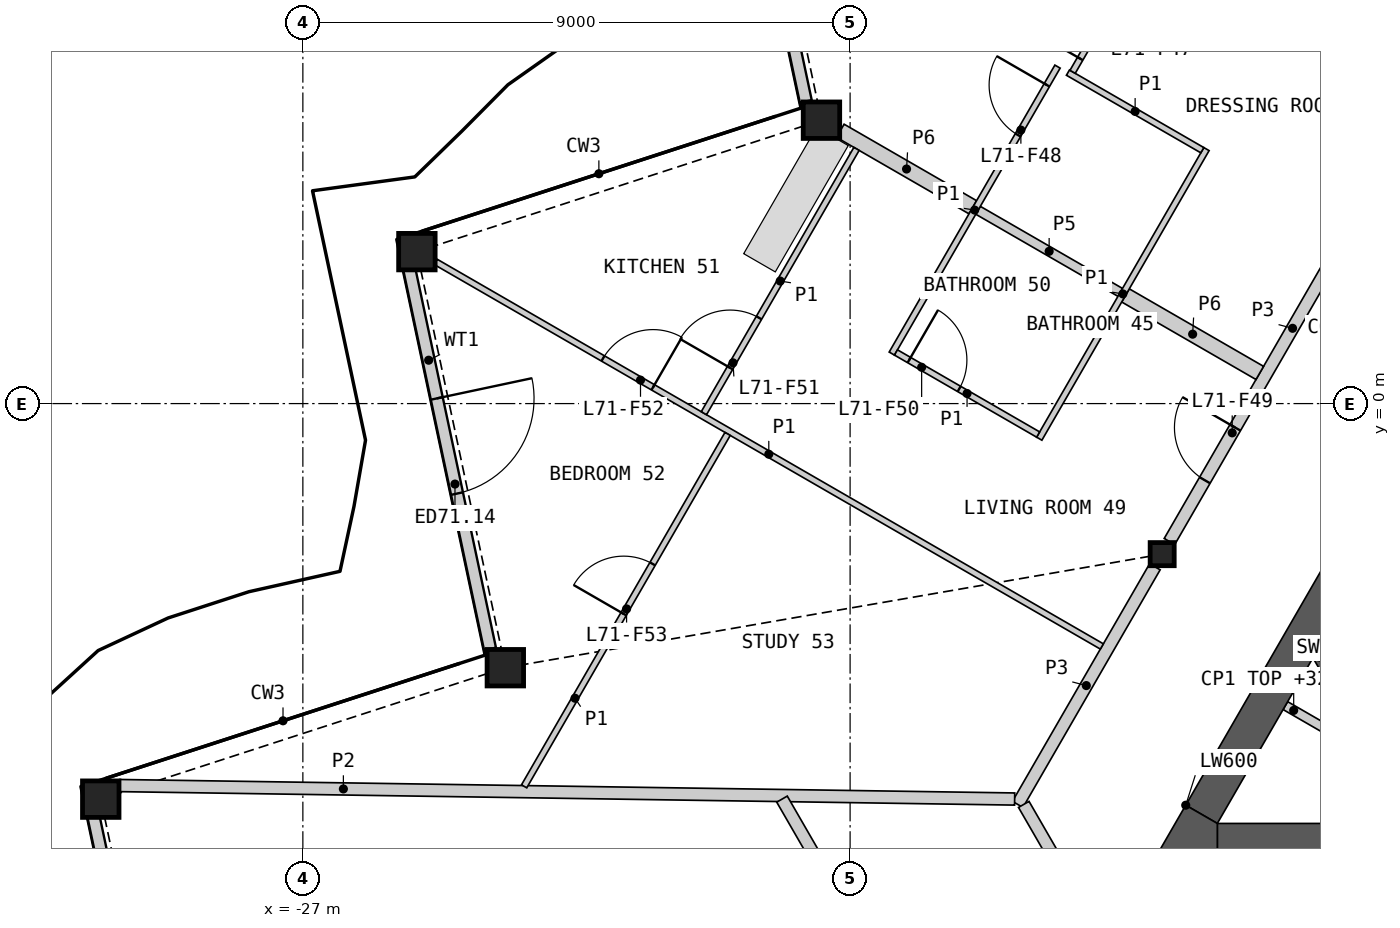
"""IFC4 building model, lengths in metres.
Left out: names, types, materials, properties, quantities, classifications, styles, units other than length and angle.
Written with IfcOpenShell. Run it as: python <this file> out.ifc"""

import sys

from ifc_helpers import new_model, si_unit, direction, frame, frame_2d, origin, origin_2d, place, context, subcontext, project, spatial, polyline, rectangle, hollow_rectangle, i_section, outline, extrude, element, fill, save


model = new_model("IFC4")
c1 = context("Model", 3, precision=1e-05, world=origin(), true_north=direction((0.0, 1.0)))
c2 = subcontext(c1, "Body", "Model", "MODEL_VIEW")
j1 = project(units=[si_unit("LENGTHUNIT", "METRE"), si_unit("PLANEANGLEUNIT", "RADIAN")], contexts=[c1])
p1 = place(None, origin())
s1 = spatial("IfcSite", under=j1, at=p1, CompositionType="ELEMENT")
p2 = place(p1, origin())
s2 = spatial("IfcBuilding", under=s1, at=p2, CompositionType="ELEMENT")
p3 = place(p2, frame((0.0, 0.0, 322.2)))
s3 = spatial("IfcBuildingStorey", under=s2, at=p3, CompositionType="ELEMENT", Elevation=322.2)
for number, where, z_axis, x_axis in (
    (1, (-18.471, 4.661, 0.0), (0.0, 0.0, 1.0), (1.0, 0.0, 0.0)),
    (2, (-25.125, 2.499, 0.0), (0.0, 0.0, 1.0), (1.0, 0.0, 0.0)),
    (3, (-23.67, -4.344, 0.0), (0.0, 0.0, 1.0), (1.0, 0.0, 0.0)),
    (4, (-30.324, -6.506, 0.0), (0.0, 0.0, 1.0), (1.0, 0.0, 0.0)),
):
    element("IfcColumn", number, at=place(p3, frame(where, z_axis=z_axis, x_axis=x_axis)), inside=s3, PredefinedType="COLUMN", context=c2, shape_type="SweptSolid", body=[
        extrude(hollow_rectangle(XDim=0.6, YDim=0.6, WallThickness=0.04, at=origin_2d()), origin(), (0.0, 0.0, 1.0), 3.4),
    ])
p4 = place(p3, frame((-12.868, -2.476, 0.0), z_axis=(0.0, 0.0, 1.0), x_axis=(1.0, 0.0, 0.0)))
e5 = element("IfcColumn", 5, at=p4, inside=s3, PredefinedType="COLUMN", context=c2, shape_type="SweptSolid", body=[
    extrude(i_section(OverallWidth=0.396, OverallDepth=0.381, WebThickness=0.019, FlangeThickness=0.03, at=origin_2d()), origin(), (0.0, 0.0, 1.0), 3.4),
])
p5 = place(p3, frame((-20.073, 11.294, 0.0), z_axis=(0.0, 0.0, 1.0), x_axis=(0.207893978909, -0.978151365349, 0.0)))
e6 = element("IfcWall", 6, at=p5, inside=s3, PredefinedType="SOLIDWALL", context=c2, shape_type="SweptSolid", body=[
    extrude(rectangle(XDim=6.466, YDim=0.2, at=frame_2d((3.233, 0.0))), origin(), (0.0, 0.0, 1.0), 2.488),
])
p6 = place(p5, frame((2.261, 0.0, 0.0)))
e7 = element("IfcOpeningElement", 7, at=p6, cuts=e6, PredefinedType="OPENING", context=c2, shape_type="SweptSolid", body=[
    extrude(rectangle(XDim=1.6, YDim=2.25, at=frame_2d((0.8, 1.125))), frame((0.0, 0.11, 0.0), z_axis=(0.0, -1.0, 0.0), x_axis=(1.0, 0.0, 0.0)), (0.0, 0.0, 1.0), 0.22),
])
p7 = place(p3, frame((-25.268, 2.297, 0.0), z_axis=(0.0, 0.0, 1.0), x_axis=(0.207937232358, -0.978142171363, 0.0)))
e8 = element("IfcWall", 8, at=p7, inside=s3, PredefinedType="SOLIDWALL", context=c2, shape_type="SweptSolid", body=[
    extrude(rectangle(XDim=6.474, YDim=0.2, at=frame_2d((3.237, 0.0))), origin(), (0.0, 0.0, 1.0), 2.488),
])
p8 = place(p7, frame((2.261, 0.0, 0.0)))
e9 = element("IfcOpeningElement", 9, at=p8, cuts=e8, PredefinedType="OPENING", context=c2, shape_type="SweptSolid", body=[
    extrude(rectangle(XDim=1.6, YDim=2.25, at=frame_2d((0.8, 1.125))), frame((0.0, 0.11, 0.0), z_axis=(0.0, -1.0, 0.0), x_axis=(1.0, 0.0, 0.0)), (0.0, 0.0, 1.0), 0.22),
])
p9 = place(p3, frame((-30.462, -6.701, 0.0), z_axis=(0.0, 0.0, 1.0), x_axis=(0.207915966693, -0.978146691859, 0.0)))
e10 = element("IfcWall", 10, at=p9, inside=s3, PredefinedType="SOLIDWALL", context=c2, shape_type="SweptSolid", body=[
    extrude(rectangle(XDim=6.482, YDim=0.2, at=frame_2d((3.241, 0.0))), origin(), (0.0, 0.0, 1.0), 2.488),
])
p10 = place(p9, frame((2.261, 0.0, 0.0)))
e11 = element("IfcOpeningElement", 11, at=p10, cuts=e10, PredefinedType="OPENING", context=c2, shape_type="SweptSolid", body=[
    extrude(rectangle(XDim=1.6, YDim=2.25, at=frame_2d((0.8, 1.125))), frame((0.0, 0.11, 0.0), z_axis=(0.0, -1.0, 0.0), x_axis=(1.0, 0.0, 0.0)), (0.0, 0.0, 1.0), 0.22),
])
p11 = place(p3, origin())
e12 = element("IfcWall", 12, at=p11, inside=s3, PredefinedType="SHEAR", context=c2, shape_type="SweptSolid", body=[
    extrude(outline(polyline([(-5.307, -1.281), (-10.374, -4.206), (-10.032, -4.298), (-5.182, -1.498), (-5.307, -1.281)])), origin(), (0.0, 0.0, 1.0), 3.1),
])
p12 = place(p3, origin())
e13 = element("IfcWall", 13, at=p12, inside=s3, PredefinedType="SHEAR", context=c2, shape_type="SweptSolid", body=[
    extrude(outline(polyline([(-10.374, -4.206), (-8.83, -6.881), (-8.738, -6.539), (-10.032, -4.298), (-10.374, -4.206)])), origin(), (0.0, 0.0, 1.0), 3.1),
])
p13 = place(p3, frame((-10.842, -4.967, 0.0), z_axis=(0.0, 0.0, 1.0), x_axis=(0.866098216386, -0.499873863663, 0.0)))
e14 = element("IfcWall", 14, at=p13, inside=s3, PredefinedType="PARTITIONING", context=c2, shape_type="SweptSolid", body=[
    extrude(rectangle(XDim=1.582, YDim=0.15, at=frame_2d((0.791, 0.0))), origin(), (0.0, 0.0, 1.0), 3.1),
])
p14 = place(p3, frame((-11.961, -7.206, 0.0), z_axis=(0.0, 0.0, 1.0), x_axis=(1.0, 0.0, 0.0)))
e15 = element("IfcWall", 15, at=p14, inside=s3, PredefinedType="SHEAR", context=c2, shape_type="SweptSolid", body=[
    extrude(rectangle(XDim=4.868, YDim=0.6, at=frame_2d((2.434, 0.0))), origin(), (0.0, 0.0, 1.0), 3.1),
])
p15 = place(p3, frame((-9.941, -2.807, 0.0), z_axis=(0.0, 0.0, 1.0), x_axis=(-0.500020646047, -0.866013483456, 0.0)))
e16 = element("IfcWall", 16, at=p15, inside=s3, PredefinedType="SHEAR", context=c2, shape_type="SweptSolid", body=[
    extrude(rectangle(XDim=4.559, YDim=0.6, at=frame_2d((2.28, 0.0))), origin(), (0.0, 0.0, 1.0), 3.1),
])
p16 = place(p3, origin())
e17 = element("IfcWall", 17, at=p16, inside=s3, PredefinedType="SHEAR", context=c2, shape_type="SweptSolid", body=[
    extrude(outline(polyline([(-12.48, -6.606), (-11.961, -6.906), (-11.961, -7.506), (-13.0, -7.506), (-12.48, -6.606)])), origin(), (0.0, 0.0, 1.0), 3.1),
])
p17 = place(p3, frame((-12.748, -2.269, 0.0), z_axis=(0.0, 0.0, 1.0), x_axis=(0.499984266882, 0.866034487114, 0.0)))
e18 = element("IfcWall", 18, at=p17, inside=s3, PredefinedType="PARTITIONING", context=c2, shape_type="SweptSolid", body=[
    extrude(rectangle(XDim=8.099, YDim=0.2, at=frame_2d((4.049, 0.0))), origin(), (0.0, 0.0, 1.0), 3.1),
])
p18 = place(p17, frame((1.164, 0.0, 0.0)))
e19 = element("IfcOpeningElement", 19, at=p18, cuts=e18, PredefinedType="OPENING", context=c2, shape_type="SweptSolid", body=[
    extrude(rectangle(XDim=1.0, YDim=2.1, at=frame_2d((0.5, 1.05))), frame((0.0, 0.11, 0.0), z_axis=(0.0, -1.0, 0.0), x_axis=(1.0, 0.0, 0.0)), (0.0, 0.0, 1.0), 0.22),
])
p19 = place(p3, frame((-15.244, -6.592, 0.0), z_axis=(0.0, 0.0, 1.0), x_axis=(0.49999094734, 0.866030630277, 0.0)))
e20 = element("IfcWall", 20, at=p19, inside=s3, PredefinedType="PARTITIONING", context=c2, shape_type="SweptSolid", body=[
    extrude(rectangle(XDim=4.513, YDim=0.2, at=frame_2d((2.256, 0.0))), origin(), (0.0, 0.0, 1.0), 3.1),
])
p20 = place(p3, frame((-15.144, -6.592, 0.0), z_axis=(0.0, 0.0, 1.0), x_axis=(0.499958791762, -0.866049194065, 0.0)))
e21 = element("IfcWall", 21, at=p20, inside=s3, PredefinedType="PARTITIONING", context=c2, shape_type="SweptSolid", body=[
    extrude(rectangle(XDim=3.726, YDim=0.2, at=frame_2d((1.863, 0.0))), origin(), (0.0, 0.0, 1.0), 3.1),
])
p21 = place(p20, frame((1.388, 0.0, 0.0)))
e22 = element("IfcOpeningElement", 22, at=p21, cuts=e21, PredefinedType="OPENING", context=c2, shape_type="SweptSolid", body=[
    extrude(rectangle(XDim=0.95, YDim=2.1, at=frame_2d((0.475, 1.05))), frame((0.0, 0.11, 0.0), z_axis=(0.0, -1.0, 0.0), x_axis=(1.0, 0.0, 0.0)), (0.0, 0.0, 1.0), 0.22),
])
p22 = place(p3, frame((-13.471, 1.779, 0.0), z_axis=(0.0, 0.0, 1.0), x_axis=(0.865989465428, -0.500062241894, 0.0)))
e23 = element("IfcWall", 23, at=p22, inside=s3, PredefinedType="PARTITIONING", context=c2, shape_type="SweptSolid", body=[
    extrude(rectangle(XDim=2.55, YDim=0.25, at=frame_2d((1.275, 0.0))), origin(), (0.0, 0.0, 1.0), 2.33),
])
p23 = place(p3, frame((-18.161, 4.487, 0.0), z_axis=(0.0, 0.0, 1.0), x_axis=(0.866012646713, -0.500022095245, 0.0)))
e24 = element("IfcWall", 24, at=p23, inside=s3, PredefinedType="PARTITIONING", context=c2, shape_type="SweptSolid", body=[
    extrude(rectangle(XDim=2.516, YDim=0.25, at=frame_2d((1.258, 0.0))), origin(), (0.0, 0.0, 1.0), 2.33),
])
p24 = place(p3, frame((-30.014, -6.282, 0.0), z_axis=(0.0, 0.0, 1.0), x_axis=(0.99988686643, -0.015041753265, 0.0)))
e25 = element("IfcWall", 25, at=p24, inside=s3, PredefinedType="PARTITIONING", context=c2, shape_type="SweptSolid", body=[
    extrude(rectangle(XDim=14.721, YDim=0.2, at=frame_2d((7.361, 0.0))), origin(), (0.0, 0.0, 1.0), 2.33),
])
p25 = place(p3, frame((-19.12, -6.506, 0.0), z_axis=(0.0, 0.0, 1.0), x_axis=(0.499978535015, -0.866037796245, 0.0)))
e26 = element("IfcWall", 26, at=p25, inside=s3, PredefinedType="PARTITIONING", context=c2, shape_type="SweptSolid", body=[
    extrude(rectangle(XDim=3.686, YDim=0.2, at=frame_2d((1.843, 0.0))), origin(), (0.0, 0.0, 1.0), 2.33),
])
p26 = place(p3, frame((-15.896, 3.179, 0.0), z_axis=(0.0, 0.0, 1.0), x_axis=(0.866059108428, -0.4999416173, 0.0)))
e27 = element("IfcWall", 27, at=p26, inside=s3, PredefinedType="PLUMBINGWALL", context=c2, shape_type="SweptSolid", body=[
    extrude(rectangle(XDim=2.7, YDim=0.15, at=frame_2d((1.35, 0.0))), origin(), (0.0, 0.0, 1.0), 2.33),
])
p27 = place(p3, frame((-24.815, 2.33, 0.0), z_axis=(0.0, 0.0, 1.0), x_axis=(0.866027776657, -0.499995890042, 0.0)))
e28 = element("IfcWall", 28, at=p27, inside=s3, PredefinedType="PARTITIONING", context=c2, shape_type="SweptSolid", body=[
    extrude(rectangle(XDim=12.649, YDim=0.1, at=frame_2d((6.325, 0.0))), origin(), (0.0, 0.0, 1.0), 2.33),
])
p28 = place(p27, frame((3.176, 0.0, 0.0)))
e29 = element("IfcOpeningElement", 29, at=p28, cuts=e28, PredefinedType="OPENING", context=c2, shape_type="SweptSolid", body=[
    extrude(rectangle(XDim=0.95, YDim=2.1, at=frame_2d((0.475, 1.05))), frame((0.0, 0.06, 0.0), z_axis=(0.0, -1.0, 0.0), x_axis=(1.0, 0.0, 0.0)), (0.0, 0.0, 1.0), 0.12),
])
p29 = place(p3, frame((-19.615, 11.325, 0.0), z_axis=(0.0, 0.0, 1.0), x_axis=(0.86602139559, -0.500006942333, 0.0)))
e30 = element("IfcWall", 30, at=p29, inside=s3, PredefinedType="PARTITIONING", context=c2, shape_type="SweptSolid", body=[
    extrude(rectangle(XDim=12.505, YDim=0.1, at=frame_2d((6.252, 0.0))), origin(), (0.0, 0.0, 1.0), 2.33),
])
p30 = place(p29, frame((6.28, 0.0, 0.0)))
e31 = element("IfcOpeningElement", 31, at=p30, cuts=e30, PredefinedType="OPENING", context=c2, shape_type="SweptSolid", body=[
    extrude(rectangle(XDim=0.95, YDim=2.1, at=frame_2d((0.475, 1.05))), frame((0.0, 0.06, 0.0), z_axis=(0.0, -1.0, 0.0), x_axis=(1.0, 0.0, 0.0)), (0.0, 0.0, 1.0), 0.12),
])
p31 = place(p3, frame((-23.361, -6.295, 0.0), z_axis=(0.0, 0.0, 1.0), x_axis=(0.499987686533, 0.866032512851, 0.0)))
e32 = element("IfcWall", 32, at=p31, inside=s3, PredefinedType="PARTITIONING", context=c2, shape_type="SweptSolid", body=[
    extrude(rectangle(XDim=6.693, YDim=0.1, at=frame_2d((3.347, 0.0))), origin(), (0.0, 0.0, 1.0), 2.33),
])
p32 = place(p31, frame((3.275, 0.0, 0.0)))
e33 = element("IfcOpeningElement", 33, at=p32, cuts=e32, PredefinedType="OPENING", context=c2, shape_type="SweptSolid", body=[
    extrude(rectangle(XDim=0.95, YDim=2.1, at=frame_2d((0.475, 1.05))), frame((0.0, 0.06, 0.0), z_axis=(0.0, -1.0, 0.0), x_axis=(1.0, 0.0, 0.0)), (0.0, 0.0, 1.0), 0.12),
])
p33 = place(p3, frame((-17.314, 0.823, 0.0), z_axis=(0.0, 0.0, 1.0), x_axis=(0.499988730927, 0.866031909889, 0.0)))
e34 = element("IfcWall", 34, at=p33, inside=s3, PredefinedType="PARTITIONING", context=c2, shape_type="SweptSolid", body=[
    extrude(rectangle(XDim=5.45, YDim=0.1, at=frame_2d((2.725, 0.0))), origin(), (0.0, 0.0, 1.0), 2.33),
])
p34 = place(p33, frame((4.15, 0.0, 0.0)))
e35 = element("IfcOpeningElement", 35, at=p34, cuts=e34, PredefinedType="OPENING", context=c2, shape_type="SweptSolid", body=[
    extrude(rectangle(XDim=0.95, YDim=2.1, at=frame_2d((0.475, 1.05))), frame((0.0, 0.06, 0.0), z_axis=(0.0, -1.0, 0.0), x_axis=(1.0, 0.0, 0.0)), (0.0, 0.0, 1.0), 0.12),
])
p35 = place(p3, frame((-14.889, -0.577, 0.0), z_axis=(0.0, 0.0, 1.0), x_axis=(0.500015767406, 0.866016300277, 0.0)))
e36 = element("IfcWall", 36, at=p35, inside=s3, PredefinedType="PARTITIONING", context=c2, shape_type="SweptSolid", body=[
    extrude(rectangle(XDim=5.5, YDim=0.1, at=frame_2d((2.75, 0.0))), origin(), (0.0, 0.0, 1.0), 2.33),
])
p36 = place(p3, frame((-20.405, -0.158, 0.0), z_axis=(0.0, 0.0, 1.0), x_axis=(0.499989096993, 0.866031698547, 0.0)))
e37 = element("IfcWall", 37, at=p36, inside=s3, PredefinedType="PARTITIONING", context=c2, shape_type="SweptSolid", body=[
    extrude(rectangle(XDim=5.02, YDim=0.1, at=frame_2d((2.51, 0.0))), origin(), (0.0, 0.0, 1.0), 2.33),
])
p37 = place(p36, frame((0.862, 0.0, 0.0)))
e38 = element("IfcOpeningElement", 38, at=p37, cuts=e37, PredefinedType="OPENING", context=c2, shape_type="SweptSolid", body=[
    extrude(rectangle(XDim=0.95, YDim=2.1, at=frame_2d((0.475, 1.05))), frame((0.0, 0.06, 0.0), z_axis=(0.0, -1.0, 0.0), x_axis=(1.0, 0.0, 0.0)), (0.0, 0.0, 1.0), 0.12),
])
p38 = place(p3, frame((-17.246, 0.841, 0.0), z_axis=(0.0, 0.0, 1.0), x_axis=(0.86599734893, -0.500048589285, 0.0)))
e39 = element("IfcWall", 39, at=p38, inside=s3, PredefinedType="PARTITIONING", context=c2, shape_type="SweptSolid", body=[
    extrude(rectangle(XDim=2.7, YDim=0.1, at=frame_2d((1.35, 0.0))), origin(), (0.0, 0.0, 1.0), 2.33),
])
p39 = place(p38, frame((0.25, 0.0, 0.0)))
e40 = element("IfcOpeningElement", 40, at=p39, cuts=e39, PredefinedType="OPENING", context=c2, shape_type="SweptSolid", body=[
    extrude(rectangle(XDim=0.95, YDim=2.1, at=frame_2d((0.475, 1.05))), frame((0.0, 0.06, 0.0), z_axis=(0.0, -1.0, 0.0), x_axis=(1.0, 0.0, 0.0)), (0.0, 0.0, 1.0), 0.12),
])
p40 = place(p3, frame((-14.417, 5.443, 0.0), z_axis=(0.0, 0.0, 1.0), x_axis=(0.865991210529, -0.500059219779, 0.0)))
e41 = element("IfcWall", 41, at=p40, inside=s3, PredefinedType="PARTITIONING", context=c2, shape_type="SweptSolid", body=[
    extrude(rectangle(XDim=2.552, YDim=0.1, at=frame_2d((1.276, 0.0))), origin(), (0.0, 0.0, 1.0), 2.33),
])
p41 = place(p3, frame((-14.341, 5.457, 0.0), z_axis=(0.0, 0.0, 1.0), x_axis=(0.499954846121, 0.866051471819, 0.0)))
e42 = element("IfcWall", 42, at=p41, inside=s3, PredefinedType="PARTITIONING", context=c2, shape_type="SweptSolid", body=[
    extrude(rectangle(XDim=2.395, YDim=0.1, at=frame_2d((1.197, 0.0))), origin(), (0.0, 0.0, 1.0), 2.33),
])
p42 = place(p41, frame((0.25, 0.0, 0.0)))
e43 = element("IfcOpeningElement", 43, at=p42, cuts=e42, PredefinedType="OPENING", context=c2, shape_type="SweptSolid", body=[
    extrude(rectangle(XDim=0.95, YDim=2.1, at=frame_2d((0.475, 1.05))), frame((0.0, 0.06, 0.0), z_axis=(0.0, -1.0, 0.0), x_axis=(1.0, 0.0, 0.0)), (0.0, 0.0, 1.0), 0.12),
])
p43 = place(p8, origin())
e44 = element("IfcDoor", 44, at=p43, inside=s3, OperationType="DOUBLE_DOOR_SINGLE_SWING", PredefinedType="DOOR", context=c2, shape_type="SweptSolid", body=[
    extrude(rectangle(XDim=1.6, YDim=2.25, at=frame_2d((0.8, 1.125))), frame((0.0, 0.025, 0.0), z_axis=(0.0, -1.0, 0.0), x_axis=(1.0, 0.0, 0.0)), (0.0, 0.0, 1.0), 0.05),
])
fill(e9, e44)
p44 = place(p42, origin())
e45 = element("IfcDoor", 45, at=p44, inside=s3, OperationType="SINGLE_SWING_LEFT", PredefinedType="DOOR", context=c2, shape_type="SweptSolid", body=[
    extrude(rectangle(XDim=0.95, YDim=2.1, at=frame_2d((0.475, 1.05))), frame((0.0, 0.025, 0.0), z_axis=(0.0, -1.0, 0.0), x_axis=(1.0, 0.0, 0.0)), (0.0, 0.0, 1.0), 0.05),
])
fill(e43, e45)
p45 = place(p34, origin())
e46 = element("IfcDoor", 46, at=p45, inside=s3, OperationType="SINGLE_SWING_RIGHT", PredefinedType="DOOR", context=c2, shape_type="SweptSolid", body=[
    extrude(rectangle(XDim=0.95, YDim=2.1, at=frame_2d((0.475, 1.05))), frame((0.0, 0.025, 0.0), z_axis=(0.0, -1.0, 0.0), x_axis=(1.0, 0.0, 0.0)), (0.0, 0.0, 1.0), 0.05),
])
fill(e35, e46)
p46 = place(p18, origin())
e47 = element("IfcDoor", 47, at=p46, inside=s3, OperationType="SINGLE_SWING_RIGHT", PredefinedType="DOOR", context=c2, shape_type="SweptSolid", body=[
    extrude(rectangle(XDim=1.0, YDim=2.1, at=frame_2d((0.5, 1.05))), frame((0.0, 0.025, 0.0), z_axis=(0.0, -1.0, 0.0), x_axis=(1.0, 0.0, 0.0)), (0.0, 0.0, 1.0), 0.05),
])
fill(e19, e47)
p47 = place(p39, origin())
e48 = element("IfcDoor", 48, at=p47, inside=s3, OperationType="SINGLE_SWING_LEFT", PredefinedType="DOOR", context=c2, shape_type="SweptSolid", body=[
    extrude(rectangle(XDim=0.95, YDim=2.1, at=frame_2d((0.475, 1.05))), frame((0.0, 0.025, 0.0), z_axis=(0.0, -1.0, 0.0), x_axis=(1.0, 0.0, 0.0)), (0.0, 0.0, 1.0), 0.05),
])
fill(e40, e48)
p48 = place(p37, origin())
e49 = element("IfcDoor", 49, at=p48, inside=s3, OperationType="SINGLE_SWING_LEFT", PredefinedType="DOOR", context=c2, shape_type="SweptSolid", body=[
    extrude(rectangle(XDim=0.95, YDim=2.1, at=frame_2d((0.475, 1.05))), frame((0.0, 0.025, 0.0), z_axis=(0.0, -1.0, 0.0), x_axis=(1.0, 0.0, 0.0)), (0.0, 0.0, 1.0), 0.05),
])
fill(e38, e49)
p49 = place(p28, origin())
e50 = element("IfcDoor", 50, at=p49, inside=s3, OperationType="SINGLE_SWING_RIGHT", PredefinedType="DOOR", context=c2, shape_type="SweptSolid", body=[
    extrude(rectangle(XDim=0.95, YDim=2.1, at=frame_2d((0.475, 1.05))), frame((0.0, 0.025, 0.0), z_axis=(0.0, -1.0, 0.0), x_axis=(1.0, 0.0, 0.0)), (0.0, 0.0, 1.0), 0.05),
])
fill(e29, e50)
p50 = place(p32, origin())
e51 = element("IfcDoor", 51, at=p50, inside=s3, OperationType="SINGLE_SWING_LEFT", PredefinedType="DOOR", context=c2, shape_type="SweptSolid", body=[
    extrude(rectangle(XDim=0.95, YDim=2.1, at=frame_2d((0.475, 1.05))), frame((0.0, 0.025, 0.0), z_axis=(0.0, -1.0, 0.0), x_axis=(1.0, 0.0, 0.0)), (0.0, 0.0, 1.0), 0.05),
])
fill(e33, e51)
save(model, sys.argv[1])
